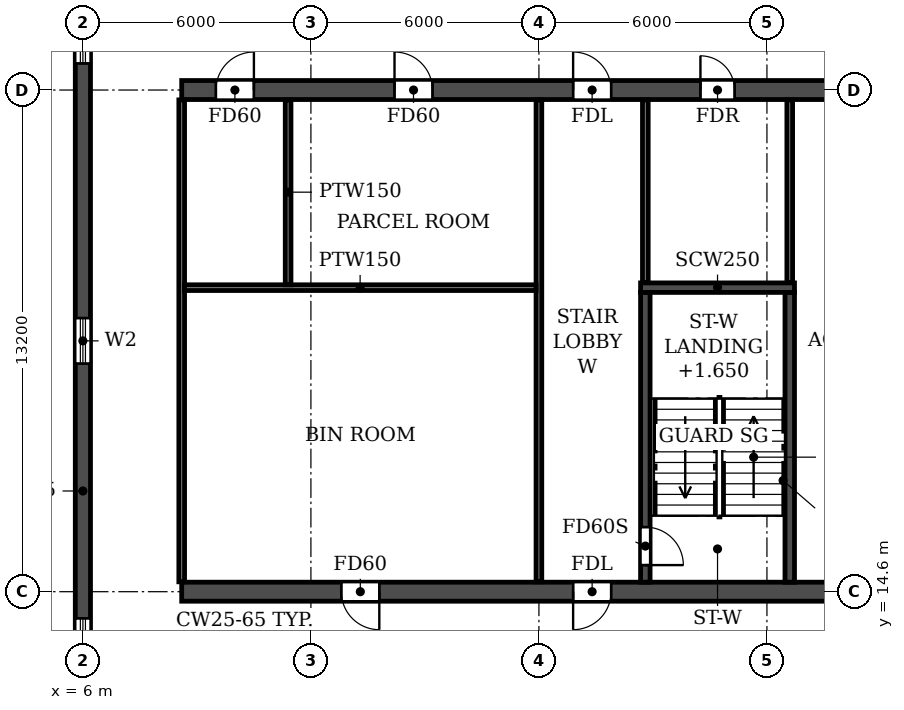
"""IFC4 building model, lengths in metres.
Left out: names, types, materials, properties, quantities, classifications, styles, units other than length and angle.
Written with IfcOpenShell. Run it as: python <this file> out.ifc"""

import sys

from ifc_helpers import new_model, si_unit, direction, frame, frame_2d, origin, place, context, subcontext, project, spatial, rectangle, extrude, element, fill, save


model = new_model("IFC4")
c1 = context("Model", 3, precision=1e-05, world=origin(), true_north=direction((0.0, 1.0)))
c2 = subcontext(c1, "Body", "Model", "MODEL_VIEW")
j1 = project(units=[si_unit("LENGTHUNIT", "METRE"), si_unit("PLANEANGLEUNIT", "RADIAN")], contexts=[c1])
p1 = place(None, origin())
s1 = spatial("IfcSite", under=j1, at=p1, CompositionType="ELEMENT")
p2 = place(p1, origin())
s2 = spatial("IfcBuilding", under=s1, at=p2, CompositionType="ELEMENT")
p3 = place(p2, frame((0.0, 0.0, 92.7)))
s3 = spatial("IfcBuildingStorey", under=s2, at=p3, CompositionType="ELEMENT", Elevation=92.7)
p4 = place(p3, frame((6.0, 4.683, 0.0), z_axis=(0.0, 0.0, 1.0), x_axis=(0.0, 1.0, 0.0)))
e1 = element("IfcWall", 1, at=p4, inside=s3, PredefinedType="SHEAR", context=c2, shape_type="SweptSolid", body=[
    extrude(rectangle(XDim=34.234, YDim=0.4, at=frame_2d((17.117, 0.0))), origin(), (0.0, 0.0, 1.0), 3.06),
])
p5 = place(p4, frame((23.817, 0.0, 0.9)))
e2 = element("IfcOpeningElement", 2, at=p5, cuts=e1, PredefinedType="OPENING", context=c2, shape_type="SweptSolid", body=[
    extrude(rectangle(XDim=1.2, YDim=1.5, at=frame_2d((0.6, 0.75))), frame((0.0, 0.21, 0.0), z_axis=(0.0, -1.0, 0.0), x_axis=(1.0, 0.0, 0.0)), (0.0, 0.0, 1.0), 0.42),
])
p6 = place(p4, frame((8.017, 0.0, 0.9)))
e3 = element("IfcOpeningElement", 3, at=p6, cuts=e1, PredefinedType="OPENING", context=c2, shape_type="SweptSolid", body=[
    extrude(rectangle(XDim=1.2, YDim=1.5, at=frame_2d((0.6, 0.75))), frame((0.0, 0.21, 0.0), z_axis=(0.0, -1.0, 0.0), x_axis=(1.0, 0.0, 0.0)), (0.0, 0.0, 1.0), 0.42),
])
p7 = place(p4, frame((15.917, 0.0, 0.9)))
e4 = element("IfcOpeningElement", 4, at=p7, cuts=e1, PredefinedType="OPENING", context=c2, shape_type="SweptSolid", body=[
    extrude(rectangle(XDim=1.2, YDim=1.5, at=frame_2d((0.6, 0.75))), frame((0.0, 0.21, 0.0), z_axis=(0.0, -1.0, 0.0), x_axis=(1.0, 0.0, 0.0)), (0.0, 0.0, 1.0), 0.42),
])
p8 = place(p4, frame((28.894, 0.0, 0.6)))
e5 = element("IfcOpeningElement", 5, at=p8, cuts=e1, PredefinedType="OPENING", context=c2, shape_type="SweptSolid", body=[
    extrude(rectangle(XDim=2.2, YDim=1.8, at=frame_2d((1.1, 0.9))), frame((0.0, 0.21, 0.0), z_axis=(0.0, -1.0, 0.0), x_axis=(1.0, 0.0, 0.0)), (0.0, 0.0, 1.0), 0.42),
])
p9 = place(p4, frame((2.541, 0.0, 0.6)))
e6 = element("IfcOpeningElement", 6, at=p9, cuts=e1, PredefinedType="OPENING", context=c2, shape_type="SweptSolid", body=[
    extrude(rectangle(XDim=2.2, YDim=1.8, at=frame_2d((1.1, 0.9))), frame((0.0, 0.21, 0.0), z_axis=(0.0, -1.0, 0.0), x_axis=(1.0, 0.0, 0.0)), (0.0, 0.0, 1.0), 0.42),
])
p10 = place(p3, frame((8.6, 14.6, 0.0), z_axis=(0.0, 0.0, 1.0), x_axis=(1.0, 0.0, 0.0)))
e7 = element("IfcWall", 7, at=p10, inside=s3, PredefinedType="SOLIDWALL", context=c2, shape_type="SweptSolid", body=[
    extrude(rectangle(XDim=84.8, YDim=0.5, at=frame_2d((42.4, 0.0))), origin(), (0.0, 0.0, 1.0), 3.06),
])
p11 = place(p10, frame((4.2, 0.0, 0.0)))
e8 = element("IfcOpeningElement", 8, at=p11, cuts=e7, PredefinedType="OPENING", context=c2, shape_type="SweptSolid", body=[
    extrude(rectangle(XDim=1.0, YDim=2.1, at=frame_2d((0.5, 1.05))), frame((0.0, 0.26, 0.0), z_axis=(0.0, -1.0, 0.0), x_axis=(1.0, 0.0, 0.0)), (0.0, 0.0, 1.0), 0.52),
])
p12 = place(p10, frame((10.3, 0.0, 0.0)))
e9 = element("IfcOpeningElement", 9, at=p12, cuts=e7, PredefinedType="OPENING", context=c2, shape_type="SweptSolid", body=[
    extrude(rectangle(XDim=1.0, YDim=2.1, at=frame_2d((0.5, 1.05))), frame((0.0, 0.26, 0.0), z_axis=(0.0, -1.0, 0.0), x_axis=(1.0, 0.0, 0.0)), (0.0, 0.0, 1.0), 0.52),
])
p13 = place(p10, frame((18.2, 0.0, 0.0)))
e10 = element("IfcOpeningElement", 10, at=p13, cuts=e7, PredefinedType="OPENING", context=c2, shape_type="SweptSolid", body=[
    extrude(rectangle(XDim=1.0, YDim=2.1, at=frame_2d((0.5, 1.05))), frame((0.0, 0.26, 0.0), z_axis=(0.0, -1.0, 0.0), x_axis=(1.0, 0.0, 0.0)), (0.0, 0.0, 1.0), 0.52),
])
p14 = place(p10, frame((22.8, 0.0, 0.0)))
e11 = element("IfcOpeningElement", 11, at=p14, cuts=e7, PredefinedType="OPENING", context=c2, shape_type="SweptSolid", body=[
    extrude(rectangle(XDim=1.0, YDim=2.1, at=frame_2d((0.5, 1.05))), frame((0.0, 0.26, 0.0), z_axis=(0.0, -1.0, 0.0), x_axis=(1.0, 0.0, 0.0)), (0.0, 0.0, 1.0), 0.52),
])
p15 = place(p10, frame((34.1, 0.0, 0.0)))
e12 = element("IfcOpeningElement", 12, at=p15, cuts=e7, PredefinedType="OPENING", context=c2, shape_type="SweptSolid", body=[
    extrude(rectangle(XDim=1.0, YDim=2.1, at=frame_2d((0.5, 1.05))), frame((0.0, 0.26, 0.0), z_axis=(0.0, -1.0, 0.0), x_axis=(1.0, 0.0, 0.0)), (0.0, 0.0, 1.0), 0.52),
])
p16 = place(p10, frame((38.0, 0.0, 0.0)))
e13 = element("IfcOpeningElement", 13, at=p16, cuts=e7, PredefinedType="OPENING", context=c2, shape_type="SweptSolid", body=[
    extrude(rectangle(XDim=1.0, YDim=2.1, at=frame_2d((0.5, 1.05))), frame((0.0, 0.26, 0.0), z_axis=(0.0, -1.0, 0.0), x_axis=(1.0, 0.0, 0.0)), (0.0, 0.0, 1.0), 0.52),
])
p17 = place(p10, frame((41.9, 0.0, 0.0)))
e14 = element("IfcOpeningElement", 14, at=p17, cuts=e7, PredefinedType="OPENING", context=c2, shape_type="SweptSolid", body=[
    extrude(rectangle(XDim=1.0, YDim=2.1, at=frame_2d((0.5, 1.05))), frame((0.0, 0.26, 0.0), z_axis=(0.0, -1.0, 0.0), x_axis=(1.0, 0.0, 0.0)), (0.0, 0.0, 1.0), 0.52),
])
p18 = place(p10, frame((47.1, 0.0, 0.0)))
e15 = element("IfcOpeningElement", 15, at=p18, cuts=e7, PredefinedType="OPENING", context=c2, shape_type="SweptSolid", body=[
    extrude(rectangle(XDim=1.0, YDim=2.1, at=frame_2d((0.5, 1.05))), frame((0.0, 0.26, 0.0), z_axis=(0.0, -1.0, 0.0), x_axis=(1.0, 0.0, 0.0)), (0.0, 0.0, 1.0), 0.52),
])
p19 = place(p10, frame((61.0, 0.0, 0.0)))
e16 = element("IfcOpeningElement", 16, at=p19, cuts=e7, PredefinedType="OPENING", context=c2, shape_type="SweptSolid", body=[
    extrude(rectangle(XDim=1.0, YDim=2.1, at=frame_2d((0.5, 1.05))), frame((0.0, 0.26, 0.0), z_axis=(0.0, -1.0, 0.0), x_axis=(1.0, 0.0, 0.0)), (0.0, 0.0, 1.0), 0.52),
])
p20 = place(p10, frame((65.6, 0.0, 0.0)))
e17 = element("IfcOpeningElement", 17, at=p20, cuts=e7, PredefinedType="OPENING", context=c2, shape_type="SweptSolid", body=[
    extrude(rectangle(XDim=1.0, YDim=2.1, at=frame_2d((0.5, 1.05))), frame((0.0, 0.26, 0.0), z_axis=(0.0, -1.0, 0.0), x_axis=(1.0, 0.0, 0.0)), (0.0, 0.0, 1.0), 0.52),
])
p21 = place(p10, frame((73.5, 0.0, 0.0)))
e18 = element("IfcOpeningElement", 18, at=p21, cuts=e7, PredefinedType="OPENING", context=c2, shape_type="SweptSolid", body=[
    extrude(rectangle(XDim=1.0, YDim=2.1, at=frame_2d((0.5, 1.05))), frame((0.0, 0.26, 0.0), z_axis=(0.0, -1.0, 0.0), x_axis=(1.0, 0.0, 0.0)), (0.0, 0.0, 1.0), 0.52),
])
p22 = place(p10, frame((76.25, 0.0, 0.0)))
e19 = element("IfcOpeningElement", 19, at=p22, cuts=e7, PredefinedType="OPENING", context=c2, shape_type="SweptSolid", body=[
    extrude(rectangle(XDim=1.0, YDim=2.1, at=frame_2d((0.5, 1.05))), frame((0.0, 0.26, 0.0), z_axis=(0.0, -1.0, 0.0), x_axis=(1.0, 0.0, 0.0)), (0.0, 0.0, 1.0), 0.52),
])
p23 = place(p10, frame((80.95, 0.0, 0.0)))
e20 = element("IfcOpeningElement", 20, at=p23, cuts=e7, PredefinedType="OPENING", context=c2, shape_type="SweptSolid", body=[
    extrude(rectangle(XDim=1.0, YDim=2.1, at=frame_2d((0.5, 1.05))), frame((0.0, 0.26, 0.0), z_axis=(0.0, -1.0, 0.0), x_axis=(1.0, 0.0, 0.0)), (0.0, 0.0, 1.0), 0.52),
])
p24 = place(p3, frame((8.6, 27.8, 0.0), z_axis=(0.0, 0.0, 1.0), x_axis=(1.0, 0.0, 0.0)))
e21 = element("IfcWall", 21, at=p24, inside=s3, PredefinedType="SOLIDWALL", context=c2, shape_type="SweptSolid", body=[
    extrude(rectangle(XDim=84.8, YDim=0.5, at=frame_2d((42.4, 0.0))), origin(), (0.0, 0.0, 1.0), 3.06),
])
p25 = place(p24, frame((0.9, 0.0, 0.0)))
e22 = element("IfcOpeningElement", 22, at=p25, cuts=e21, PredefinedType="OPENING", context=c2, shape_type="SweptSolid", body=[
    extrude(rectangle(XDim=1.0, YDim=2.1, at=frame_2d((0.5, 1.05))), frame((0.0, 0.26, 0.0), z_axis=(0.0, -1.0, 0.0), x_axis=(1.0, 0.0, 0.0)), (0.0, 0.0, 1.0), 0.52),
])
p26 = place(p24, frame((5.6, 0.0, 0.0)))
e23 = element("IfcOpeningElement", 23, at=p26, cuts=e21, PredefinedType="OPENING", context=c2, shape_type="SweptSolid", body=[
    extrude(rectangle(XDim=1.0, YDim=2.1, at=frame_2d((0.5, 1.05))), frame((0.0, 0.26, 0.0), z_axis=(0.0, -1.0, 0.0), x_axis=(1.0, 0.0, 0.0)), (0.0, 0.0, 1.0), 0.52),
])
p27 = place(p24, frame((10.3, 0.0, 0.0)))
e24 = element("IfcOpeningElement", 24, at=p27, cuts=e21, PredefinedType="OPENING", context=c2, shape_type="SweptSolid", body=[
    extrude(rectangle(XDim=1.0, YDim=2.1, at=frame_2d((0.5, 1.05))), frame((0.0, 0.26, 0.0), z_axis=(0.0, -1.0, 0.0), x_axis=(1.0, 0.0, 0.0)), (0.0, 0.0, 1.0), 0.52),
])
p28 = place(p24, frame((13.65, 0.0, 0.0)))
e25 = element("IfcOpeningElement", 25, at=p28, cuts=e21, PredefinedType="OPENING", context=c2, shape_type="SweptSolid", body=[
    extrude(rectangle(XDim=0.9, YDim=2.1, at=frame_2d((0.45, 1.05))), frame((0.0, 0.26, 0.0), z_axis=(0.0, -1.0, 0.0), x_axis=(1.0, 0.0, 0.0)), (0.0, 0.0, 1.0), 0.52),
])
p29 = place(p24, frame((22.85, 0.0, 0.0)))
e26 = element("IfcOpeningElement", 26, at=p29, cuts=e21, PredefinedType="OPENING", context=c2, shape_type="SweptSolid", body=[
    extrude(rectangle(XDim=0.9, YDim=2.1, at=frame_2d((0.45, 1.05))), frame((0.0, 0.26, 0.0), z_axis=(0.0, -1.0, 0.0), x_axis=(1.0, 0.0, 0.0)), (0.0, 0.0, 1.0), 0.52),
])
p30 = place(p24, frame((26.0, 0.0, 0.0)))
e27 = element("IfcOpeningElement", 27, at=p30, cuts=e21, PredefinedType="OPENING", context=c2, shape_type="SweptSolid", body=[
    extrude(rectangle(XDim=1.0, YDim=2.1, at=frame_2d((0.5, 1.05))), frame((0.0, 0.26, 0.0), z_axis=(0.0, -1.0, 0.0), x_axis=(1.0, 0.0, 0.0)), (0.0, 0.0, 1.0), 0.52),
])
p31 = place(p24, frame((31.2, 0.0, 0.0)))
e28 = element("IfcOpeningElement", 28, at=p31, cuts=e21, PredefinedType="OPENING", context=c2, shape_type="SweptSolid", body=[
    extrude(rectangle(XDim=1.0, YDim=2.1, at=frame_2d((0.5, 1.05))), frame((0.0, 0.26, 0.0), z_axis=(0.0, -1.0, 0.0), x_axis=(1.0, 0.0, 0.0)), (0.0, 0.0, 1.0), 0.52),
])
p32 = place(p24, frame((39.0, 0.0, 0.0)))
e29 = element("IfcOpeningElement", 29, at=p32, cuts=e21, PredefinedType="OPENING", context=c2, shape_type="SweptSolid", body=[
    extrude(rectangle(XDim=1.0, YDim=2.1, at=frame_2d((0.5, 1.05))), frame((0.0, 0.26, 0.0), z_axis=(0.0, -1.0, 0.0), x_axis=(1.0, 0.0, 0.0)), (0.0, 0.0, 1.0), 0.52),
])
p33 = place(p24, frame((41.9, 0.0, 0.0)))
e30 = element("IfcOpeningElement", 30, at=p33, cuts=e21, PredefinedType="OPENING", context=c2, shape_type="SweptSolid", body=[
    extrude(rectangle(XDim=1.0, YDim=2.1, at=frame_2d((0.5, 1.05))), frame((0.0, 0.26, 0.0), z_axis=(0.0, -1.0, 0.0), x_axis=(1.0, 0.0, 0.0)), (0.0, 0.0, 1.0), 0.52),
])
p34 = place(p24, frame((46.1, 0.0, 0.0)))
e31 = element("IfcOpeningElement", 31, at=p34, cuts=e21, PredefinedType="OPENING", context=c2, shape_type="SweptSolid", body=[
    extrude(rectangle(XDim=1.0, YDim=2.1, at=frame_2d((0.5, 1.05))), frame((0.0, 0.26, 0.0), z_axis=(0.0, -1.0, 0.0), x_axis=(1.0, 0.0, 0.0)), (0.0, 0.0, 1.0), 0.52),
])
p35 = place(p24, frame((50.0, 0.0, 0.0)))
e32 = element("IfcOpeningElement", 32, at=p35, cuts=e21, PredefinedType="OPENING", context=c2, shape_type="SweptSolid", body=[
    extrude(rectangle(XDim=1.0, YDim=2.1, at=frame_2d((0.5, 1.05))), frame((0.0, 0.26, 0.0), z_axis=(0.0, -1.0, 0.0), x_axis=(1.0, 0.0, 0.0)), (0.0, 0.0, 1.0), 0.52),
])
p36 = place(p24, frame((52.6, 0.0, 0.0)))
e33 = element("IfcOpeningElement", 33, at=p36, cuts=e21, PredefinedType="OPENING", context=c2, shape_type="SweptSolid", body=[
    extrude(rectangle(XDim=1.0, YDim=2.1, at=frame_2d((0.5, 1.05))), frame((0.0, 0.26, 0.0), z_axis=(0.0, -1.0, 0.0), x_axis=(1.0, 0.0, 0.0)), (0.0, 0.0, 1.0), 0.52),
])
p37 = place(p24, frame((56.25, 0.0, 0.0)))
e34 = element("IfcOpeningElement", 34, at=p37, cuts=e21, PredefinedType="OPENING", context=c2, shape_type="SweptSolid", body=[
    extrude(rectangle(XDim=1.5, YDim=2.1, at=frame_2d((0.75, 1.05))), frame((0.0, 0.26, 0.0), z_axis=(0.0, -1.0, 0.0), x_axis=(1.0, 0.0, 0.0)), (0.0, 0.0, 1.0), 0.52),
])
p38 = place(p24, frame((61.05, 0.0, 0.0)))
e35 = element("IfcOpeningElement", 35, at=p38, cuts=e21, PredefinedType="OPENING", context=c2, shape_type="SweptSolid", body=[
    extrude(rectangle(XDim=0.9, YDim=2.1, at=frame_2d((0.45, 1.05))), frame((0.0, 0.26, 0.0), z_axis=(0.0, -1.0, 0.0), x_axis=(1.0, 0.0, 0.0)), (0.0, 0.0, 1.0), 0.52),
])
p39 = place(p24, frame((70.25, 0.0, 0.0)))
e36 = element("IfcOpeningElement", 36, at=p39, cuts=e21, PredefinedType="OPENING", context=c2, shape_type="SweptSolid", body=[
    extrude(rectangle(XDim=0.9, YDim=2.1, at=frame_2d((0.45, 1.05))), frame((0.0, 0.26, 0.0), z_axis=(0.0, -1.0, 0.0), x_axis=(1.0, 0.0, 0.0)), (0.0, 0.0, 1.0), 0.52),
])
p40 = place(p24, frame((73.5, 0.0, 0.0)))
e37 = element("IfcOpeningElement", 37, at=p40, cuts=e21, PredefinedType="OPENING", context=c2, shape_type="SweptSolid", body=[
    extrude(rectangle(XDim=1.0, YDim=2.1, at=frame_2d((0.5, 1.05))), frame((0.0, 0.26, 0.0), z_axis=(0.0, -1.0, 0.0), x_axis=(1.0, 0.0, 0.0)), (0.0, 0.0, 1.0), 0.52),
])
p41 = place(p24, frame((79.6, 0.0, 0.0)))
e38 = element("IfcOpeningElement", 38, at=p41, cuts=e21, PredefinedType="OPENING", context=c2, shape_type="SweptSolid", body=[
    extrude(rectangle(XDim=1.0, YDim=2.1, at=frame_2d((0.5, 1.05))), frame((0.0, 0.26, 0.0), z_axis=(0.0, -1.0, 0.0), x_axis=(1.0, 0.0, 0.0)), (0.0, 0.0, 1.0), 0.52),
])
p42 = place(p3, frame((20.8, 14.85, 0.0), z_axis=(0.0, 0.0, 1.0), x_axis=(0.0, 1.0, 0.0)))
e39 = element("IfcWall", 39, at=p42, inside=s3, PredefinedType="SOLIDWALL", context=c2, shape_type="SweptSolid", body=[
    extrude(rectangle(XDim=7.625, YDim=0.25, at=frame_2d((3.812, 0.0))), origin(), (0.0, 0.0, 1.0), 3.06),
])
p43 = place(p42, frame((0.45, 0.0, 0.0)))
e40 = element("IfcOpeningElement", 40, at=p43, cuts=e39, PredefinedType="OPENING", context=c2, shape_type="SweptSolid", body=[
    extrude(rectangle(XDim=1.0, YDim=2.1, at=frame_2d((0.5, 1.05))), frame((0.0, 0.135, 0.0), z_axis=(0.0, -1.0, 0.0), x_axis=(1.0, 0.0, 0.0)), (0.0, 0.0, 1.0), 0.27),
])
p44 = place(p3, frame((24.6, 14.85, 0.0), z_axis=(0.0, 0.0, 1.0), x_axis=(0.0, 1.0, 0.0)))
e41 = element("IfcWall", 41, at=p44, inside=s3, PredefinedType="SOLIDWALL", context=c2, shape_type="SweptSolid", body=[
    extrude(rectangle(XDim=7.625, YDim=0.25, at=frame_2d((3.812, 0.0))), origin(), (0.0, 0.0, 1.0), 3.06),
])
p45 = place(p3, frame((20.675, 22.6, 0.0), z_axis=(0.0, 0.0, 1.0), x_axis=(1.0, 0.0, 0.0)))
e42 = element("IfcWall", 42, at=p45, inside=s3, PredefinedType="SOLIDWALL", context=c2, shape_type="SweptSolid", body=[
    extrude(rectangle(XDim=4.05, YDim=0.25, at=frame_2d((2.025, 0.0))), origin(), (0.0, 0.0, 1.0), 3.06),
])
for number, where, z_axis, x_axis in (
    (43, (8.6, 14.86, 0.0), (0.0, 0.0, 1.0), (0.0, 1.0, 0.0)),
    (44, (18.0, 14.86, 0.0), (0.0, 0.0, 1.0), (0.0, 1.0, 0.0)),
):
    element("IfcWall", number, at=place(p3, frame(where, z_axis=z_axis, x_axis=x_axis)), inside=s3, PredefinedType="PARTITIONING", context=c2, shape_type="SweptSolid", body=[
        extrude(rectangle(XDim=12.68, YDim=0.15, at=frame_2d((6.34, 0.0))), origin(), (0.0, 0.0, 1.0), 3.06),
    ])
p46 = place(p3, frame((8.675, 22.6, 0.0), z_axis=(0.0, 0.0, 1.0), x_axis=(1.0, 0.0, 0.0)))
e45 = element("IfcWall", 45, at=p46, inside=s3, PredefinedType="PARTITIONING", context=c2, shape_type="SweptSolid", body=[
    extrude(rectangle(XDim=9.25, YDim=0.15, at=frame_2d((4.625, 0.0))), origin(), (0.0, 0.0, 1.0), 3.06),
])
p47 = place(p3, frame((11.4, 22.675, 0.0), z_axis=(0.0, 0.0, 1.0), x_axis=(0.0, 1.0, 0.0)))
e46 = element("IfcWall", 46, at=p47, inside=s3, PredefinedType="PARTITIONING", context=c2, shape_type="SweptSolid", body=[
    extrude(rectangle(XDim=4.865, YDim=0.15, at=frame_2d((2.433, 0.0))), origin(), (0.0, 0.0, 1.0), 3.06),
])
for number, where, z_axis, x_axis in (
    (47, (20.8, 22.735, 0.0), (0.0, 0.0, 1.0), (0.0, 1.0, 0.0)),
    (48, (24.6, 22.735, 0.0), (0.0, 0.0, 1.0), (0.0, 1.0, 0.0)),
):
    element("IfcWall", number, at=place(p3, frame(where, z_axis=z_axis, x_axis=x_axis)), inside=s3, PredefinedType="PARTITIONING", context=c2, shape_type="SweptSolid", body=[
        extrude(rectangle(XDim=4.805, YDim=0.15, at=frame_2d((2.402, 0.0))), origin(), (0.0, 0.0, 1.0), 3.06),
    ])
p48 = place(p5, origin())
e49 = element("IfcWindow", 49, at=p48, inside=s3, PartitioningType="SINGLE_PANEL", PredefinedType="WINDOW", context=c2, shape_type="SweptSolid", body=[
    extrude(rectangle(XDim=1.2, YDim=1.5, at=frame_2d((0.6, 0.75))), frame((0.0, 0.03, 0.0), z_axis=(0.0, -1.0, 0.0), x_axis=(1.0, 0.0, 0.0)), (0.0, 0.0, 1.0), 0.06),
])
fill(e2, e49)
p49 = place(p6, origin())
e50 = element("IfcWindow", 50, at=p49, inside=s3, PartitioningType="SINGLE_PANEL", PredefinedType="WINDOW", context=c2, shape_type="SweptSolid", body=[
    extrude(rectangle(XDim=1.2, YDim=1.5, at=frame_2d((0.6, 0.75))), frame((0.0, 0.03, 0.0), z_axis=(0.0, -1.0, 0.0), x_axis=(1.0, 0.0, 0.0)), (0.0, 0.0, 1.0), 0.06),
])
fill(e3, e50)
p50 = place(p7, origin())
e51 = element("IfcWindow", 51, at=p50, inside=s3, PartitioningType="SINGLE_PANEL", PredefinedType="WINDOW", context=c2, shape_type="SweptSolid", body=[
    extrude(rectangle(XDim=1.2, YDim=1.5, at=frame_2d((0.6, 0.75))), frame((0.0, 0.03, 0.0), z_axis=(0.0, -1.0, 0.0), x_axis=(1.0, 0.0, 0.0)), (0.0, 0.0, 1.0), 0.06),
])
fill(e4, e51)
p51 = place(p25, origin())
e52 = element("IfcDoor", 52, at=p51, inside=s3, OperationType="SINGLE_SWING_RIGHT", PredefinedType="DOOR", context=c2, shape_type="SweptSolid", body=[
    extrude(rectangle(XDim=1.0, YDim=2.1, at=frame_2d((0.5, 1.05))), frame((0.0, 0.025, 0.0), z_axis=(0.0, -1.0, 0.0), x_axis=(1.0, 0.0, 0.0)), (0.0, 0.0, 1.0), 0.05),
])
fill(e22, e52)
p52 = place(p26, origin())
e53 = element("IfcDoor", 53, at=p52, inside=s3, OperationType="SINGLE_SWING_LEFT", PredefinedType="DOOR", context=c2, shape_type="SweptSolid", body=[
    extrude(rectangle(XDim=1.0, YDim=2.1, at=frame_2d((0.5, 1.05))), frame((0.0, 0.025, 0.0), z_axis=(0.0, -1.0, 0.0), x_axis=(1.0, 0.0, 0.0)), (0.0, 0.0, 1.0), 0.05),
])
fill(e23, e53)
p53 = place(p27, origin())
e54 = element("IfcDoor", 54, at=p53, inside=s3, OperationType="SINGLE_SWING_LEFT", PredefinedType="DOOR", context=c2, shape_type="SweptSolid", body=[
    extrude(rectangle(XDim=1.0, YDim=2.1, at=frame_2d((0.5, 1.05))), frame((0.0, 0.025, 0.0), z_axis=(0.0, -1.0, 0.0), x_axis=(1.0, 0.0, 0.0)), (0.0, 0.0, 1.0), 0.05),
])
fill(e24, e54)
p54 = place(p28, origin())
e55 = element("IfcDoor", 55, at=p54, inside=s3, OperationType="SINGLE_SWING_LEFT", PredefinedType="DOOR", context=c2, shape_type="SweptSolid", body=[
    extrude(rectangle(XDim=0.9, YDim=2.1, at=frame_2d((0.45, 1.05))), frame((0.0, 0.025, 0.0), z_axis=(0.0, -1.0, 0.0), x_axis=(1.0, 0.0, 0.0)), (0.0, 0.0, 1.0), 0.05),
])
fill(e25, e55)
p55 = place(p11, frame((1.0, 0.0, 0.0), z_axis=(0.0, 0.0, 1.0), x_axis=(-1.0, 0.0, 0.0)))
e56 = element("IfcDoor", 56, at=p55, inside=s3, OperationType="SINGLE_SWING_LEFT", PredefinedType="DOOR", context=c2, shape_type="SweptSolid", body=[
    extrude(rectangle(XDim=1.0, YDim=2.1, at=frame_2d((0.5, 1.05))), frame((0.0, 0.025, 0.0), z_axis=(0.0, -1.0, 0.0), x_axis=(1.0, 0.0, 0.0)), (0.0, 0.0, 1.0), 0.05),
])
fill(e8, e56)
p56 = place(p12, frame((1.0, 0.0, 0.0), z_axis=(0.0, 0.0, 1.0), x_axis=(-1.0, 0.0, 0.0)))
e57 = element("IfcDoor", 57, at=p56, inside=s3, OperationType="SINGLE_SWING_RIGHT", PredefinedType="DOOR", context=c2, shape_type="SweptSolid", body=[
    extrude(rectangle(XDim=1.0, YDim=2.1, at=frame_2d((0.5, 1.05))), frame((0.0, 0.025, 0.0), z_axis=(0.0, -1.0, 0.0), x_axis=(1.0, 0.0, 0.0)), (0.0, 0.0, 1.0), 0.05),
])
fill(e9, e57)
p57 = place(p43, frame((1.0, 0.0, 0.0), z_axis=(0.0, 0.0, 1.0), x_axis=(-1.0, 0.0, 0.0)))
e58 = element("IfcDoor", 58, at=p57, inside=s3, OperationType="SINGLE_SWING_RIGHT", PredefinedType="DOOR", context=c2, shape_type="SweptSolid", body=[
    extrude(rectangle(XDim=1.0, YDim=2.1, at=frame_2d((0.5, 1.05))), frame((0.0, 0.025, 0.0), z_axis=(0.0, -1.0, 0.0), x_axis=(1.0, 0.0, 0.0)), (0.0, 0.0, 1.0), 0.05),
])
fill(e40, e58)
save(model, sys.argv[1])
